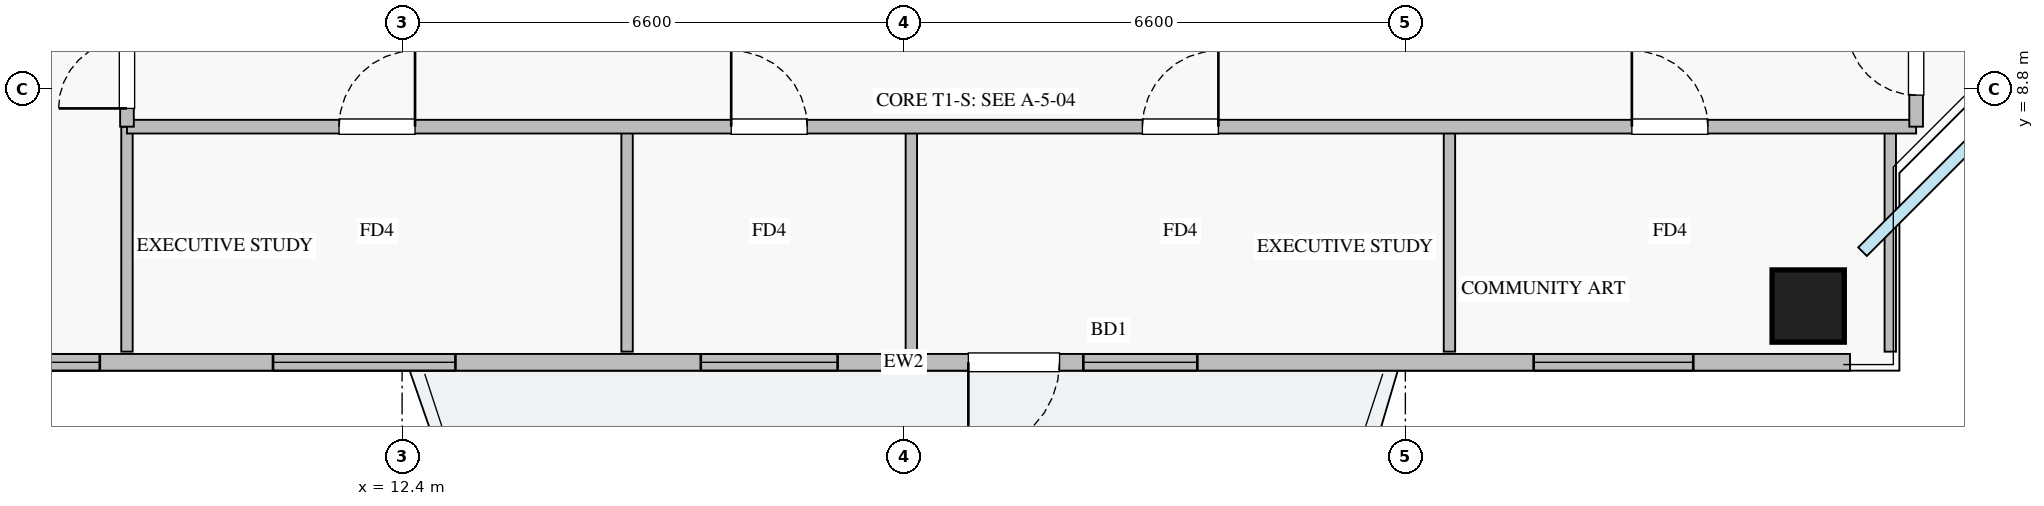
"""IFC4 building model, lengths in metres.
Left out: names, types, materials, properties, quantities, classifications, styles, units other than length and angle.
Written with IfcOpenShell. Run it as: python <this file> out.ifc"""

import sys

from ifc_helpers import new_model, si_unit, direction, frame, frame_2d, origin, origin_2d, place, context, subcontext, project, spatial, rectangle, extrude, source, transform, mapped, element, fill, save


model = new_model("IFC4")
c1 = context("Model", 3, precision=1e-05, world=origin(), true_north=direction((0.0, 1.0)))
c2 = subcontext(c1, "Body", "Model", "MODEL_VIEW")
j1 = project(units=[si_unit("LENGTHUNIT", "METRE"), si_unit("PLANEANGLEUNIT", "RADIAN")], contexts=[c1])
p1 = place(None, origin())
s1 = spatial("IfcSite", under=j1, at=p1, CompositionType="ELEMENT")
p2 = place(p1, origin())
s2 = spatial("IfcBuilding", under=s1, at=p2, CompositionType="ELEMENT")
p3 = place(p2, frame((0.0, 0.0, 176.25)))
s3 = spatial("IfcBuildingStorey", under=s2, at=p3, CompositionType="ELEMENT", Elevation=176.25)
m1 = source(origin(), c2, "Body", "SweptSolid", [
    extrude(rectangle(XDim=0.95, YDim=0.95, at=origin_2d()), origin(), (0.0, 0.0, 1.0), 3.25),
])
p4 = place(p3, frame((30.9, 5.95, 0.0), z_axis=(0.0, 0.0, 1.0), x_axis=(1.0, 0.0, 0.0)))
e1 = element("IfcColumn", 1, at=p4, inside=s3, PredefinedType="COLUMN", context=c2, shape_type="MappedRepresentation", body=[
    mapped(m1, transform((0.0, 0.0, 0.0), x_axis=(1.0, 0.0, 0.0), y_axis=(0.0, 1.0, 0.0), z_axis=(0.0, 0.0, 1.0), scale=1.0)),
])
p5 = place(p3, frame((6.55, 5.21, 0.0), z_axis=(0.0, 0.0, 1.0), x_axis=(1.0, 0.0, 0.0)))
e2 = element("IfcWall", 2, at=p5, inside=s3, PredefinedType="STANDARD", context=c2, shape_type="SweptSolid", body=[
    extrude(rectangle(XDim=24.9, YDim=0.22, at=frame_2d((12.45, 0.0))), origin(), (0.0, 0.0, 1.0), 2.61),
])
p6 = place(p5, frame((13.3, 0.0, 0.0)))
e3 = element("IfcOpeningElement", 3, at=p6, cuts=e2, PredefinedType="OPENING", context=c2, shape_type="SweptSolid", body=[
    extrude(rectangle(XDim=1.2, YDim=2.1, at=frame_2d((0.6, 1.05))), frame((0.0, 0.12, 0.0), z_axis=(0.0, -1.0, 0.0), x_axis=(1.0, 0.0, 0.0)), (0.0, 0.0, 1.0), 0.24),
])
p7 = place(p5, frame((0.373, 0.0, 0.9)))
e4 = element("IfcOpeningElement", 4, at=p7, cuts=e2, PredefinedType="OPENING", context=c2, shape_type="SweptSolid", body=[
    extrude(rectangle(XDim=1.5, YDim=1.5, at=frame_2d((0.75, 0.75))), frame((0.0, 0.12, 0.0), z_axis=(0.0, -1.0, 0.0), x_axis=(1.0, 0.0, 0.0)), (0.0, 0.0, 1.0), 0.24),
])
p8 = place(p5, frame((9.78, 0.0, 0.9)))
e5 = element("IfcOpeningElement", 5, at=p8, cuts=e2, PredefinedType="OPENING", context=c2, shape_type="SweptSolid", body=[
    extrude(rectangle(XDim=1.8, YDim=1.5, at=frame_2d((0.9, 0.75))), frame((0.0, 0.12, 0.0), z_axis=(0.0, -1.0, 0.0), x_axis=(1.0, 0.0, 0.0)), (0.0, 0.0, 1.0), 0.24),
])
p9 = place(p5, frame((14.813, 0.0, 0.9)))
e6 = element("IfcOpeningElement", 6, at=p9, cuts=e2, PredefinedType="OPENING", context=c2, shape_type="SweptSolid", body=[
    extrude(rectangle(XDim=1.5, YDim=1.45, at=frame_2d((0.75, 0.725))), frame((0.0, 0.12, 0.0), z_axis=(0.0, -1.0, 0.0), x_axis=(1.0, 0.0, 0.0)), (0.0, 0.0, 1.0), 0.24),
])
p10 = place(p5, frame((20.738, 0.0, 0.9)))
e7 = element("IfcOpeningElement", 7, at=p10, cuts=e2, PredefinedType="OPENING", context=c2, shape_type="SweptSolid", body=[
    extrude(rectangle(XDim=2.1, YDim=1.48, at=frame_2d((1.05, 0.74))), frame((0.0, 0.12, 0.0), z_axis=(0.0, -1.0, 0.0), x_axis=(1.0, 0.0, 0.0)), (0.0, 0.0, 1.0), 0.24),
])
p11 = place(p5, frame((4.152, 0.0, 0.9)))
e8 = element("IfcOpeningElement", 8, at=p11, cuts=e2, PredefinedType="OPENING", context=c2, shape_type="SweptSolid", body=[
    extrude(rectangle(XDim=2.4, YDim=1.5, at=frame_2d((1.2, 0.75))), frame((0.0, 0.12, 0.0), z_axis=(0.0, -1.0, 0.0), x_axis=(1.0, 0.0, 0.0)), (0.0, 0.0, 1.0), 0.24),
])
p12 = place(p3, frame((15.36, 5.35, 0.0), z_axis=(0.0, 0.0, 1.0), x_axis=(0.0, 1.0, 0.0)))
e9 = element("IfcWall", 9, at=p12, inside=s3, PredefinedType="PARTITIONING", context=c2, shape_type="SweptSolid", body=[
    extrude(rectangle(XDim=2.96, YDim=0.15, at=frame_2d((1.48, 0.0))), origin(), (0.0, 0.0, 1.0), 3.07),
])
p13 = place(p3, frame((19.1, 5.35, 0.0), z_axis=(0.0, 0.0, 1.0), x_axis=(0.0, 1.0, 0.0)))
e10 = element("IfcWall", 10, at=p13, inside=s3, PredefinedType="PARTITIONING", context=c2, shape_type="SweptSolid", body=[
    extrude(rectangle(XDim=2.96, YDim=0.15, at=frame_2d((1.48, 0.0))), origin(), (0.0, 0.0, 1.0), 2.815),
])
for number, where, z_axis, x_axis in (
    (11, (26.18, 5.35, 0.0), (0.0, 0.0, 1.0), (0.0, 1.0, 0.0)),
    (12, (8.78, 5.35, 0.0), (0.0, 0.0, 1.0), (0.0, 1.0, 0.0)),
    (13, (31.98, 5.35, 0.0), (0.0, 0.0, 1.0), (0.0, 1.0, 0.0)),
):
    element("IfcWall", number, at=place(p3, frame(where, z_axis=z_axis, x_axis=x_axis)), inside=s3, PredefinedType="PARTITIONING", context=c2, shape_type="SweptSolid", body=[
        extrude(rectangle(XDim=2.96, YDim=0.15, at=frame_2d((1.48, 0.0))), origin(), (0.0, 0.0, 1.0), 3.07),
    ])
p14 = place(p3, frame((8.78, 8.31, 0.0), z_axis=(0.0, 0.0, 1.0), x_axis=(1.0, 0.0, 0.0)))
e14 = element("IfcWall", 14, at=p14, inside=s3, PredefinedType="PARTITIONING", context=c2, shape_type="SweptSolid", body=[
    extrude(rectangle(XDim=23.54, YDim=0.18, at=frame_2d((11.77, 0.0))), origin(), (0.0, 0.0, 1.0), 3.07),
])
p15 = place(p14, frame((2.79, 0.0, 0.0)))
e15 = element("IfcOpeningElement", 15, at=p15, cuts=e14, PredefinedType="OPENING", context=c2, shape_type="SweptSolid", body=[
    extrude(rectangle(XDim=1.0, YDim=2.05, at=frame_2d((0.5, 1.025))), frame((0.0, 0.1, 0.0), z_axis=(0.0, -1.0, 0.0), x_axis=(1.0, 0.0, 0.0)), (0.0, 0.0, 1.0), 0.2),
])
p16 = place(p14, frame((7.95, 0.0, 0.0)))
e16 = element("IfcOpeningElement", 16, at=p16, cuts=e14, PredefinedType="OPENING", context=c2, shape_type="SweptSolid", body=[
    extrude(rectangle(XDim=1.0, YDim=2.05, at=frame_2d((0.5, 1.025))), frame((0.0, 0.1, 0.0), z_axis=(0.0, -1.0, 0.0), x_axis=(1.0, 0.0, 0.0)), (0.0, 0.0, 1.0), 0.2),
])
p17 = place(p14, frame((13.36, 0.0, 0.0)))
e17 = element("IfcOpeningElement", 17, at=p17, cuts=e14, PredefinedType="OPENING", context=c2, shape_type="SweptSolid", body=[
    extrude(rectangle(XDim=1.0, YDim=2.05, at=frame_2d((0.5, 1.025))), frame((0.0, 0.1, 0.0), z_axis=(0.0, -1.0, 0.0), x_axis=(1.0, 0.0, 0.0)), (0.0, 0.0, 1.0), 0.2),
])
p18 = place(p14, frame((19.8, 0.0, 0.0)))
e18 = element("IfcOpeningElement", 18, at=p18, cuts=e14, PredefinedType="OPENING", context=c2, shape_type="SweptSolid", body=[
    extrude(rectangle(XDim=1.0, YDim=2.05, at=frame_2d((0.5, 1.025))), frame((0.0, 0.1, 0.0), z_axis=(0.0, -1.0, 0.0), x_axis=(1.0, 0.0, 0.0)), (0.0, 0.0, 1.0), 0.2),
])
p19 = place(p3, frame((8.78, 8.31, 0.0), z_axis=(0.0, 0.0, 1.0), x_axis=(0.0, 1.0, 0.0)))
e19 = element("IfcWall", 19, at=p19, inside=s3, PredefinedType="PARTITIONING", context=c2, shape_type="SweptSolid", body=[
    extrude(rectangle(XDim=29.34, YDim=0.18, at=frame_2d((14.67, 0.0))), origin(), (0.0, 0.0, 1.0), 3.07),
])
p20 = place(p19, frame((28.045, 0.0, 0.0)))
e20 = element("IfcOpeningElement", 20, at=p20, cuts=e19, PredefinedType="OPENING", context=c2, shape_type="SweptSolid", body=[
    extrude(rectangle(XDim=0.9, YDim=2.05, at=frame_2d((0.45, 1.025))), frame((0.0, 0.1, 0.0), z_axis=(0.0, -1.0, 0.0), x_axis=(1.0, 0.0, 0.0)), (0.0, 0.0, 1.0), 0.2),
])
p21 = place(p19, frame((0.24, 0.0, 0.0)))
e21 = element("IfcOpeningElement", 21, at=p21, cuts=e19, PredefinedType="OPENING", context=c2, shape_type="SweptSolid", body=[
    extrude(rectangle(XDim=0.9, YDim=2.05, at=frame_2d((0.45, 1.025))), frame((0.0, 0.1, 0.0), z_axis=(0.0, -1.0, 0.0), x_axis=(1.0, 0.0, 0.0)), (0.0, 0.0, 1.0), 0.2),
])
p22 = place(p19, frame((7.705, 0.0, 0.0)))
e22 = element("IfcOpeningElement", 22, at=p22, cuts=e19, PredefinedType="OPENING", context=c2, shape_type="SweptSolid", body=[
    extrude(rectangle(XDim=1.0, YDim=2.05, at=frame_2d((0.5, 1.025))), frame((0.0, 0.1, 0.0), z_axis=(0.0, -1.0, 0.0), x_axis=(1.0, 0.0, 0.0)), (0.0, 0.0, 1.0), 0.2),
])
p23 = place(p19, frame((17.39, 0.0, 0.0)))
e23 = element("IfcOpeningElement", 23, at=p23, cuts=e19, PredefinedType="OPENING", context=c2, shape_type="SweptSolid", body=[
    extrude(rectangle(XDim=1.0, YDim=2.05, at=frame_2d((0.5, 1.025))), frame((0.0, 0.1, 0.0), z_axis=(0.0, -1.0, 0.0), x_axis=(1.0, 0.0, 0.0)), (0.0, 0.0, 1.0), 0.2),
])
p24 = place(p3, frame((32.32, 8.31, 0.0), z_axis=(0.0, 0.0, 1.0), x_axis=(0.0, 1.0, 0.0)))
e24 = element("IfcWall", 24, at=p24, inside=s3, PredefinedType="PARTITIONING", context=c2, shape_type="SweptSolid", body=[
    extrude(rectangle(XDim=29.34, YDim=0.18, at=frame_2d((14.67, 0.0))), origin(), (0.0, 0.0, 1.0), 3.07),
])
p25 = place(p24, frame((28.045, 0.0, 0.0)))
e25 = element("IfcOpeningElement", 25, at=p25, cuts=e24, PredefinedType="OPENING", context=c2, shape_type="SweptSolid", body=[
    extrude(rectangle(XDim=0.9, YDim=2.05, at=frame_2d((0.45, 1.025))), frame((0.0, 0.1, 0.0), z_axis=(0.0, -1.0, 0.0), x_axis=(1.0, 0.0, 0.0)), (0.0, 0.0, 1.0), 0.2),
])
p26 = place(p24, frame((0.415, 0.0, 0.0)))
e26 = element("IfcOpeningElement", 26, at=p26, cuts=e24, PredefinedType="OPENING", context=c2, shape_type="SweptSolid", body=[
    extrude(rectangle(XDim=0.9, YDim=2.05, at=frame_2d((0.45, 1.025))), frame((0.0, 0.1, 0.0), z_axis=(0.0, -1.0, 0.0), x_axis=(1.0, 0.0, 0.0)), (0.0, 0.0, 1.0), 0.2),
])
p27 = place(p24, frame((5.325, 0.0, 0.0)))
e27 = element("IfcOpeningElement", 27, at=p27, cuts=e24, PredefinedType="OPENING", context=c2, shape_type="SweptSolid", body=[
    extrude(rectangle(XDim=1.0, YDim=2.05, at=frame_2d((0.5, 1.025))), frame((0.0, 0.1, 0.0), z_axis=(0.0, -1.0, 0.0), x_axis=(1.0, 0.0, 0.0)), (0.0, 0.0, 1.0), 0.2),
])
p28 = place(p24, frame((14.095, 0.0, 0.0)))
e28 = element("IfcOpeningElement", 28, at=p28, cuts=e24, PredefinedType="OPENING", context=c2, shape_type="SweptSolid", body=[
    extrude(rectangle(XDim=1.0, YDim=2.05, at=frame_2d((0.5, 1.025))), frame((0.0, 0.1, 0.0), z_axis=(0.0, -1.0, 0.0), x_axis=(1.0, 0.0, 0.0)), (0.0, 0.0, 1.0), 0.2),
])
p29 = place(p24, frame((22.96, 0.0, 0.0)))
e29 = element("IfcOpeningElement", 29, at=p29, cuts=e24, PredefinedType="OPENING", context=c2, shape_type="SweptSolid", body=[
    extrude(rectangle(XDim=1.0, YDim=2.05, at=frame_2d((0.5, 1.025))), frame((0.0, 0.1, 0.0), z_axis=(0.0, -1.0, 0.0), x_axis=(1.0, 0.0, 0.0)), (0.0, 0.0, 1.0), 0.2),
])
m2 = source(origin(), c2, "Body", "SweptSolid", [
    extrude(rectangle(XDim=1.2, YDim=2.1, at=frame_2d((0.6, 1.05))), frame((0.0, 0.025, 0.0), z_axis=(0.0, -1.0, 0.0), x_axis=(1.0, 0.0, 0.0)), (0.0, 0.0, 1.0), 0.05),
])
p30 = place(p6, frame((1.2, 0.0, 0.0), z_axis=(0.0, 0.0, 1.0), x_axis=(-1.0, 0.0, 0.0)))
e30 = element("IfcDoor", 30, at=p30, inside=s3, OperationType="SINGLE_SWING_LEFT", PredefinedType="DOOR", context=c2, shape_type="MappedRepresentation", body=[
    mapped(m2, transform((0.0, 0.0, 0.0), x_axis=(1.0, 0.0, 0.0), y_axis=(0.0, 1.0, 0.0), z_axis=(0.0, 0.0, 1.0), scale=1.0)),
])
fill(e3, e30)
m3 = source(origin(), c2, "Body", "SweptSolid", [
    extrude(rectangle(XDim=1.5, YDim=1.5, at=frame_2d((0.75, 0.75))), frame((0.0, 0.03, 0.0), z_axis=(0.0, -1.0, 0.0), x_axis=(1.0, 0.0, 0.0)), (0.0, 0.0, 1.0), 0.06),
])
p31 = place(p7, origin())
e31 = element("IfcWindow", 31, at=p31, inside=s3, PartitioningType="TRIPLE_PANEL_VERTICAL", PredefinedType="WINDOW", context=c2, shape_type="MappedRepresentation", body=[
    mapped(m3, transform((0.0, 0.0, 0.0), x_axis=(1.0, 0.0, 0.0), y_axis=(0.0, 1.0, 0.0), z_axis=(0.0, 0.0, 1.0), scale=1.0)),
])
fill(e4, e31)
m4 = source(origin(), c2, "Body", "SweptSolid", [
    extrude(rectangle(XDim=1.8, YDim=1.5, at=frame_2d((0.9, 0.75))), frame((0.0, 0.03, 0.0), z_axis=(0.0, -1.0, 0.0), x_axis=(1.0, 0.0, 0.0)), (0.0, 0.0, 1.0), 0.06),
])
p32 = place(p8, origin())
e32 = element("IfcWindow", 32, at=p32, inside=s3, PartitioningType="DOUBLE_PANEL_VERTICAL", PredefinedType="WINDOW", context=c2, shape_type="MappedRepresentation", body=[
    mapped(m4, transform((0.0, 0.0, 0.0), x_axis=(1.0, 0.0, 0.0), y_axis=(0.0, 1.0, 0.0), z_axis=(0.0, 0.0, 1.0), scale=1.0)),
])
fill(e5, e32)
m5 = source(origin(), c2, "Body", "SweptSolid", [
    extrude(rectangle(XDim=1.5, YDim=1.45, at=frame_2d((0.75, 0.725))), frame((0.0, 0.03, 0.0), z_axis=(0.0, -1.0, 0.0), x_axis=(1.0, 0.0, 0.0)), (0.0, 0.0, 1.0), 0.06),
])
p33 = place(p9, origin())
e33 = element("IfcWindow", 33, at=p33, inside=s3, PartitioningType="DOUBLE_PANEL_VERTICAL", PredefinedType="WINDOW", context=c2, shape_type="MappedRepresentation", body=[
    mapped(m5, transform((0.0, 0.0, 0.0), x_axis=(1.0, 0.0, 0.0), y_axis=(0.0, 1.0, 0.0), z_axis=(0.0, 0.0, 1.0), scale=1.0)),
])
fill(e6, e33)
m6 = source(origin(), c2, "Body", "SweptSolid", [
    extrude(rectangle(XDim=2.1, YDim=1.48, at=frame_2d((1.05, 0.74))), frame((0.0, 0.03, 0.0), z_axis=(0.0, -1.0, 0.0), x_axis=(1.0, 0.0, 0.0)), (0.0, 0.0, 1.0), 0.06),
])
p34 = place(p10, origin())
e34 = element("IfcWindow", 34, at=p34, inside=s3, PartitioningType="TRIPLE_PANEL_VERTICAL", PredefinedType="WINDOW", context=c2, shape_type="MappedRepresentation", body=[
    mapped(m6, transform((0.0, 0.0, 0.0), x_axis=(1.0, 0.0, 0.0), y_axis=(0.0, 1.0, 0.0), z_axis=(0.0, 0.0, 1.0), scale=1.0)),
])
fill(e7, e34)
m7 = source(origin(), c2, "Body", "SweptSolid", [
    extrude(rectangle(XDim=1.0, YDim=2.05, at=frame_2d((0.5, 1.025))), frame((0.0, 0.025, 0.0), z_axis=(0.0, -1.0, 0.0), x_axis=(1.0, 0.0, 0.0)), (0.0, 0.0, 1.0), 0.05),
])
p35 = place(p15, origin())
e35 = element("IfcDoor", 35, at=p35, inside=s3, OperationType="SINGLE_SWING_RIGHT", PredefinedType="DOOR", context=c2, shape_type="MappedRepresentation", body=[
    mapped(m7, transform((0.0, 0.0, 0.0), x_axis=(1.0, 0.0, 0.0), y_axis=(0.0, 1.0, 0.0), z_axis=(0.0, 0.0, 1.0), scale=1.0)),
])
fill(e15, e35)
p36 = place(p16, origin())
e36 = element("IfcDoor", 36, at=p36, inside=s3, OperationType="SINGLE_SWING_LEFT", PredefinedType="DOOR", context=c2, shape_type="MappedRepresentation", body=[
    mapped(m7, transform((0.0, 0.0, 0.0), x_axis=(1.0, 0.0, 0.0), y_axis=(0.0, 1.0, 0.0), z_axis=(0.0, 0.0, 1.0), scale=1.0)),
])
fill(e16, e36)
p37 = place(p17, origin())
e37 = element("IfcDoor", 37, at=p37, inside=s3, OperationType="SINGLE_SWING_RIGHT", PredefinedType="DOOR", context=c2, shape_type="MappedRepresentation", body=[
    mapped(m7, transform((0.0, 0.0, 0.0), x_axis=(1.0, 0.0, 0.0), y_axis=(0.0, 1.0, 0.0), z_axis=(0.0, 0.0, 1.0), scale=1.0)),
])
fill(e17, e37)
p38 = place(p18, origin())
e38 = element("IfcDoor", 38, at=p38, inside=s3, OperationType="SINGLE_SWING_LEFT", PredefinedType="DOOR", context=c2, shape_type="MappedRepresentation", body=[
    mapped(m7, transform((0.0, 0.0, 0.0), x_axis=(1.0, 0.0, 0.0), y_axis=(0.0, 1.0, 0.0), z_axis=(0.0, 0.0, 1.0), scale=1.0)),
])
fill(e18, e38)
m8 = source(origin(), c2, "Body", "SweptSolid", [
    extrude(rectangle(XDim=0.9, YDim=2.05, at=frame_2d((0.45, 1.025))), frame((0.0, 0.025, 0.0), z_axis=(0.0, -1.0, 0.0), x_axis=(1.0, 0.0, 0.0)), (0.0, 0.0, 1.0), 0.05),
])
p39 = place(p21, origin())
e39 = element("IfcDoor", 39, at=p39, inside=s3, OperationType="SINGLE_SWING_LEFT", PredefinedType="DOOR", context=c2, shape_type="MappedRepresentation", body=[
    mapped(m8, transform((0.0, 0.0, 0.0), x_axis=(1.0, 0.0, 0.0), y_axis=(0.0, 1.0, 0.0), z_axis=(0.0, 0.0, 1.0), scale=1.0)),
])
fill(e21, e39)
p40 = place(p26, origin())
e40 = element("IfcDoor", 40, at=p40, inside=s3, OperationType="SINGLE_SWING_RIGHT", PredefinedType="DOOR", context=c2, shape_type="MappedRepresentation", body=[
    mapped(m8, transform((0.0, 0.0, 0.0), x_axis=(1.0, 0.0, 0.0), y_axis=(0.0, 1.0, 0.0), z_axis=(0.0, 0.0, 1.0), scale=1.0)),
])
fill(e26, e40)
m9 = source(origin(), c2, "Body", "SweptSolid", [
    extrude(rectangle(XDim=2.4, YDim=1.5, at=frame_2d((1.2, 0.75))), frame((0.0, 0.03, 0.0), z_axis=(0.0, -1.0, 0.0), x_axis=(1.0, 0.0, 0.0)), (0.0, 0.0, 1.0), 0.06),
])
p41 = place(p11, origin())
e41 = element("IfcWindow", 41, at=p41, inside=s3, PartitioningType="TRIPLE_PANEL_VERTICAL", PredefinedType="WINDOW", context=c2, shape_type="MappedRepresentation", body=[
    mapped(m9, transform((0.0, 0.0, 0.0), x_axis=(1.0, 0.0, 0.0), y_axis=(0.0, 1.0, 0.0), z_axis=(0.0, 0.0, 1.0), scale=1.0)),
])
fill(e8, e41)
save(model, sys.argv[1])
